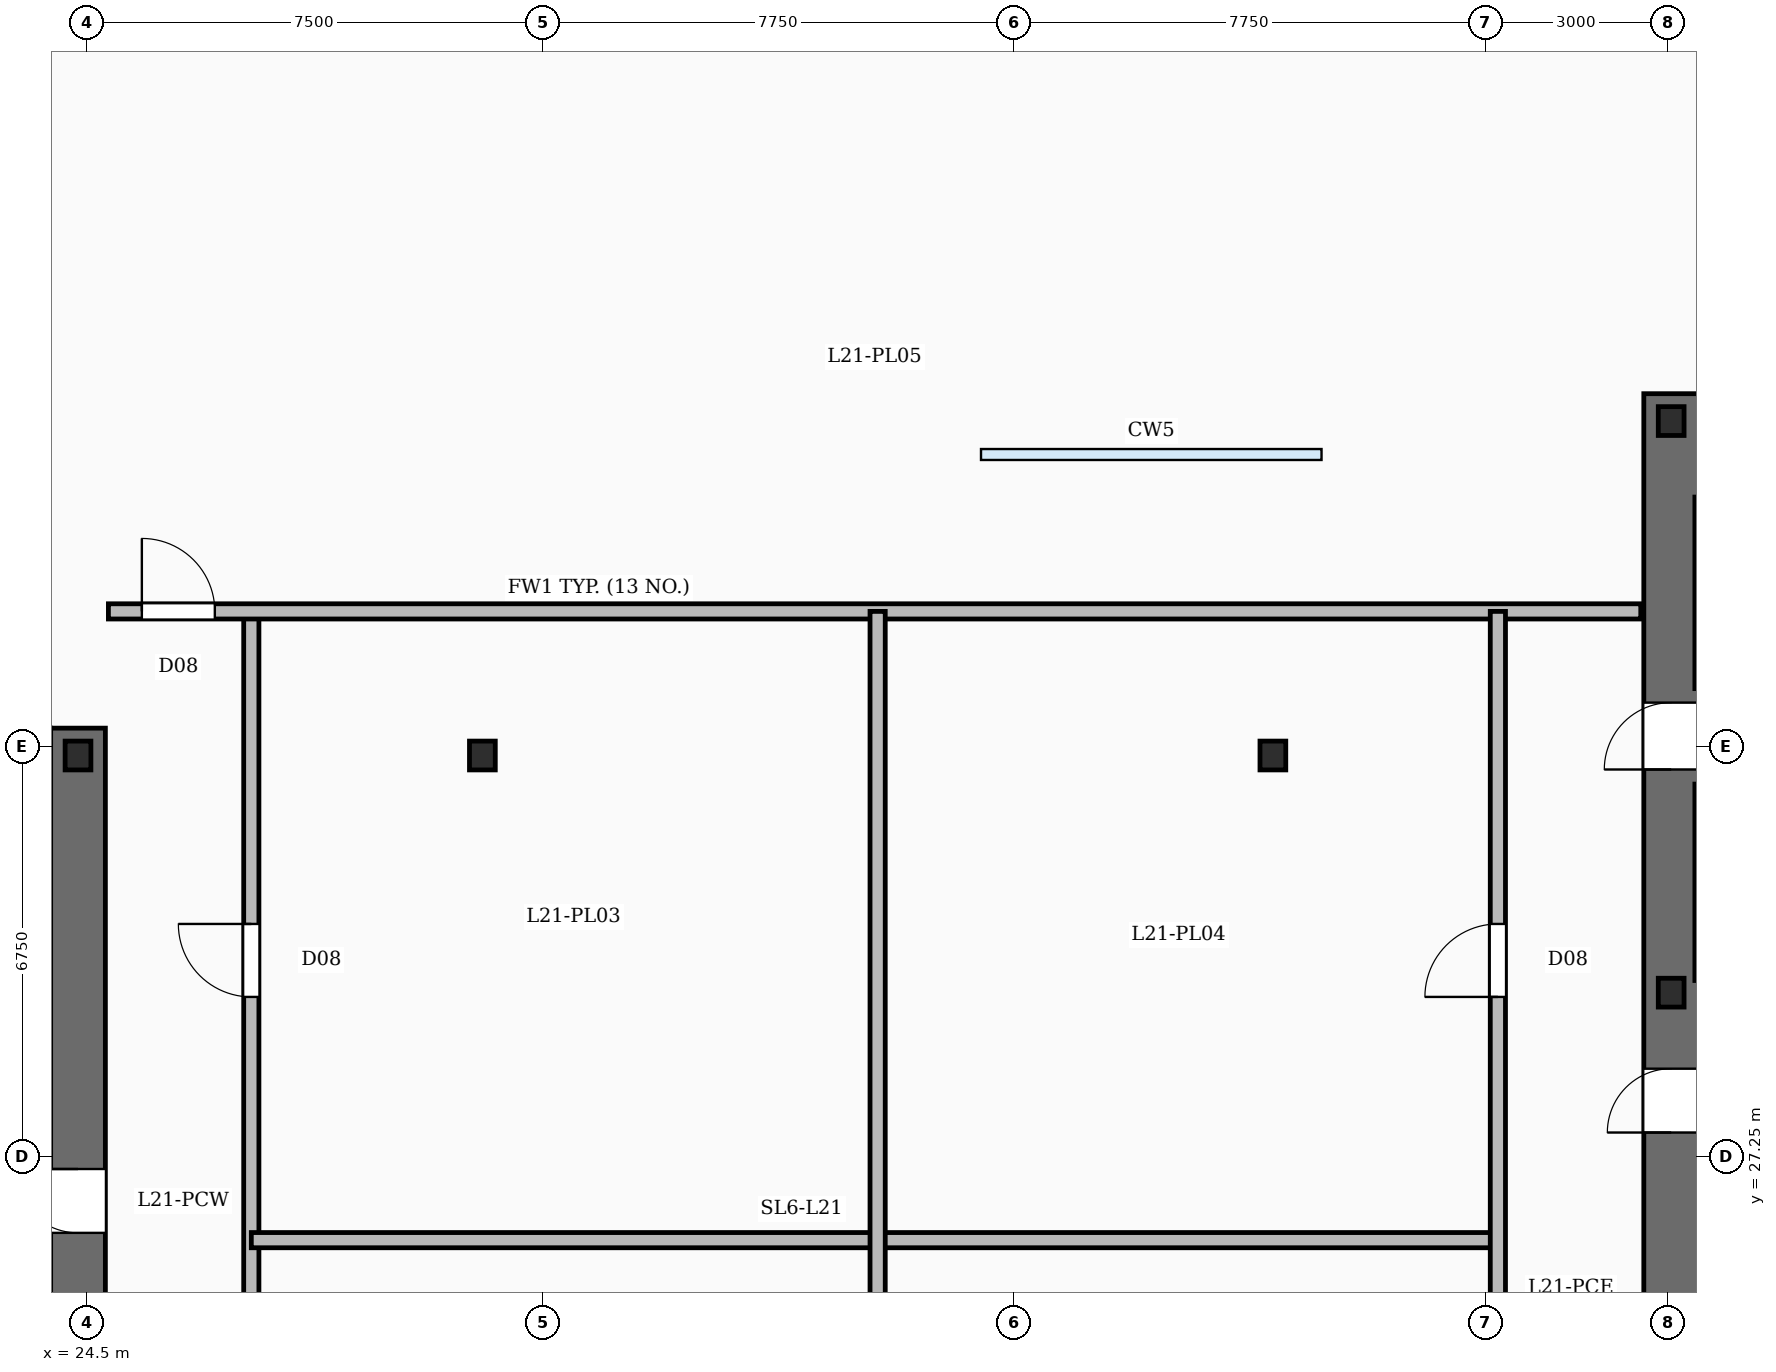
"""IFC4 building model, lengths in metres.
Left out: names, types, materials, properties, quantities, classifications, styles, units other than length and angle.
Written with IfcOpenShell. Run it as: python <this file> out.ifc"""

import sys

from ifc_helpers import new_model, si_unit, direction, frame, frame_2d, origin, origin_2d, place, context, subcontext, project, spatial, rectangle, i_section, extrude, element, fill, save


model = new_model("IFC4")
c1 = context("Model", 3, precision=1e-05, world=origin(), true_north=direction((0.0, 1.0)))
c2 = subcontext(c1, "Body", "Model", "MODEL_VIEW")
j1 = project(units=[si_unit("LENGTHUNIT", "METRE"), si_unit("PLANEANGLEUNIT", "RADIAN")], contexts=[c1])
p1 = place(None, origin())
s1 = spatial("IfcSite", under=j1, at=p1, CompositionType="ELEMENT")
p2 = place(p1, origin())
s2 = spatial("IfcBuilding", under=s1, at=p2, CompositionType="ELEMENT")
p3 = place(p2, frame((0.0, 0.0, 94.5)))
s3 = spatial("IfcBuildingStorey", under=s2, at=p3, CompositionType="ELEMENT", Elevation=94.5)
p4 = place(p3, frame((24.35, 19.0, -0.42), z_axis=(0.0, 0.0, 1.0), x_axis=(0.0, 1.0, 0.0)))
e1 = element("IfcWall", 1, at=p4, inside=s3, PredefinedType="SHEAR", context=c2, shape_type="SweptSolid", body=[
    extrude(rectangle(XDim=15.3, YDim=0.9, at=frame_2d((7.65, 0.0))), origin(), (0.0, 0.0, 1.0), 5.17),
])
p5 = place(p4, frame((2.5, 0.0, 0.42)))
e2 = element("IfcOpeningElement", 2, at=p5, cuts=e1, PredefinedType="OPENING", context=c2, shape_type="SweptSolid", body=[
    extrude(rectangle(XDim=1.05, YDim=2.15, at=frame_2d((0.525, 1.075))), frame((0.0, 0.46, 0.0), z_axis=(0.0, -1.0, 0.0), x_axis=(1.0, 0.0, 0.0)), (0.0, 0.0, 1.0), 0.92),
])
p6 = place(p4, frame((7.0, 0.0, 0.42)))
e3 = element("IfcOpeningElement", 3, at=p6, cuts=e1, PredefinedType="OPENING", context=c2, shape_type="SweptSolid", body=[
    extrude(rectangle(XDim=1.05, YDim=2.15, at=frame_2d((0.525, 1.075))), frame((0.0, 0.46, 0.0), z_axis=(0.0, -1.0, 0.0), x_axis=(1.0, 0.0, 0.0)), (0.0, 0.0, 1.0), 0.92),
])
p7 = place(p3, frame((50.55, 19.0, -0.42), z_axis=(0.0, 0.0, 1.0), x_axis=(0.0, 1.0, 0.0)))
e4 = element("IfcWall", 4, at=p7, inside=s3, PredefinedType="SHEAR", context=c2, shape_type="SweptSolid", body=[
    extrude(rectangle(XDim=20.8, YDim=0.9, at=frame_2d((10.4, 0.0))), origin(), (0.0, 0.0, 1.0), 5.17),
])
p8 = place(p7, frame((2.5, 0.0, 0.42)))
e5 = element("IfcOpeningElement", 5, at=p8, cuts=e4, PredefinedType="OPENING", context=c2, shape_type="SweptSolid", body=[
    extrude(rectangle(XDim=1.05, YDim=2.15, at=frame_2d((0.525, 1.075))), frame((0.0, 0.46, 0.0), z_axis=(0.0, -1.0, 0.0), x_axis=(1.0, 0.0, 0.0)), (0.0, 0.0, 1.0), 0.92),
])
p9 = place(p7, frame((8.65, 0.0, 0.42)))
e6 = element("IfcOpeningElement", 6, at=p9, cuts=e4, PredefinedType="OPENING", context=c2, shape_type="SweptSolid", body=[
    extrude(rectangle(XDim=1.05, YDim=2.15, at=frame_2d((0.525, 1.075))), frame((0.0, 0.46, 0.0), z_axis=(0.0, -1.0, 0.0), x_axis=(1.0, 0.0, 0.0)), (0.0, 0.0, 1.0), 0.92),
])
p10 = place(p7, frame((14.62, 0.0, 0.42)))
e7 = element("IfcOpeningElement", 7, at=p10, cuts=e4, PredefinedType="OPENING", context=c2, shape_type="SweptSolid", body=[
    extrude(rectangle(XDim=1.1, YDim=2.15, at=frame_2d((0.55, 1.075))), frame((0.0, 0.46, 0.0), z_axis=(0.0, -1.0, 0.0), x_axis=(1.0, 0.0, 0.0)), (0.0, 0.0, 1.0), 0.92),
])
for number, where, z_axis, x_axis in (
    (8, (24.35, 33.85, -0.42), (0.0, 0.0, 1.0), (1.0, 0.0, 0.0)),
    (9, (50.55, 29.95, -0.42), (0.0, 0.0, 1.0), (1.0, 0.0, 0.0)),
    (10, (50.55, 39.35, -0.42), (0.0, 0.0, 1.0), (1.0, 0.0, 0.0)),
    (11, (31.0, 33.85, -0.42), (0.0, 0.0, 1.0), (1.0, 0.0, 0.0)),
    (12, (44.0, 33.85, -0.42), (0.0, 0.0, 1.0), (1.0, 0.0, 0.0)),
):
    element("IfcColumn", number, at=place(p3, frame(where, z_axis=z_axis, x_axis=x_axis)), inside=s3, PredefinedType="COLUMN", context=c2, shape_type="SweptSolid", body=[
        extrude(i_section(OverallWidth=0.424, OverallDepth=0.474, WebThickness=0.048, FlangeThickness=0.077, FilletRadius=0.02, at=origin_2d()), origin(), (0.0, 0.0, 1.0), 5.17),
    ])
p11 = place(p3, frame((51.06, 30.15, 0.0), z_axis=(0.0, 0.0, 1.0), x_axis=(0.0, 1.0, 0.0)))
e13 = element("IfcWall", 13, at=p11, inside=s3, PredefinedType="SOLIDWALL", context=c2, shape_type="SweptSolid", body=[
    extrude(rectangle(XDim=3.23, YDim=0.24, at=frame_2d((1.615, 0.0))), origin(), (0.0, 0.0, 1.0), 4.75),
])
p12 = place(p3, frame((51.06, 34.95, 0.0), z_axis=(0.0, 0.0, 1.0), x_axis=(0.0, 1.0, 0.0)))
e14 = element("IfcWall", 14, at=p12, inside=s3, PredefinedType="SOLIDWALL", context=c2, shape_type="SweptSolid", body=[
    extrude(rectangle(XDim=3.15, YDim=0.24, at=frame_2d((1.575, 0.0))), origin(), (0.0, 0.0, 1.0), 4.75),
])
p13 = place(p3, frame((37.5, 15.38, 0.0), z_axis=(0.0, 0.0, 1.0), x_axis=(0.0, 1.0, 0.0)))
e15 = element("IfcWall", 15, at=p13, inside=s3, PredefinedType="SOLIDWALL", context=c2, shape_type="SweptSolid", body=[
    extrude(rectangle(XDim=20.84, YDim=0.25, at=frame_2d((10.42, 0.0))), origin(), (0.0, 0.0, 1.0), 3.81),
])
p14 = place(p3, frame((27.2, 25.88, 0.0), z_axis=(0.0, 0.0, 1.0), x_axis=(1.0, 0.0, 0.0)))
e16 = element("IfcWall", 16, at=p14, inside=s3, PredefinedType="SOLIDWALL", context=c2, shape_type="SweptSolid", body=[
    extrude(rectangle(XDim=20.5, YDim=0.25, at=frame_2d((10.25, 0.0))), origin(), (0.0, 0.0, 1.0), 3.81),
])
p15 = place(p3, frame((24.85, 36.22, 0.0), z_axis=(0.0, 0.0, 1.0), x_axis=(1.0, 0.0, 0.0)))
e17 = element("IfcWall", 17, at=p15, inside=s3, PredefinedType="SOLIDWALL", context=c2, shape_type="SweptSolid", body=[
    extrude(rectangle(XDim=25.2, YDim=0.25, at=frame_2d((12.6, 0.0))), origin(), (0.0, 0.0, 1.0), 3.81),
])
p16 = place(p15, frame((0.55, 0.0, 0.0)))
e18 = element("IfcOpeningElement", 18, at=p16, cuts=e17, PredefinedType="OPENING", context=c2, shape_type="SweptSolid", body=[
    extrude(rectangle(XDim=1.2, YDim=2.2, at=frame_2d((0.6, 1.1))), frame((0.0, 0.135, 0.0), z_axis=(0.0, -1.0, 0.0), x_axis=(1.0, 0.0, 0.0)), (0.0, 0.0, 1.0), 0.27),
])
p17 = place(p3, frame((27.2, 15.38, 0.0), z_axis=(0.0, 0.0, 1.0), x_axis=(0.0, 1.0, 0.0)))
e19 = element("IfcWall", 19, at=p17, inside=s3, PredefinedType="SOLIDWALL", context=c2, shape_type="SweptSolid", body=[
    extrude(rectangle(XDim=20.84, YDim=0.25, at=frame_2d((10.42, 0.0))), origin(), (0.0, 0.0, 1.0), 3.81),
])
p18 = place(p17, frame((4.8, 0.0, 0.0)))
e20 = element("IfcOpeningElement", 20, at=p18, cuts=e19, PredefinedType="OPENING", context=c2, shape_type="SweptSolid", body=[
    extrude(rectangle(XDim=1.2, YDim=2.2, at=frame_2d((0.6, 1.1))), frame((0.0, 0.135, 0.0), z_axis=(0.0, -1.0, 0.0), x_axis=(1.0, 0.0, 0.0)), (0.0, 0.0, 1.0), 0.27),
])
p19 = place(p17, frame((14.5, 0.0, 0.0)))
e21 = element("IfcOpeningElement", 21, at=p19, cuts=e19, PredefinedType="OPENING", context=c2, shape_type="SweptSolid", body=[
    extrude(rectangle(XDim=1.2, YDim=2.2, at=frame_2d((0.6, 1.1))), frame((0.0, 0.135, 0.0), z_axis=(0.0, -1.0, 0.0), x_axis=(1.0, 0.0, 0.0)), (0.0, 0.0, 1.0), 0.27),
])
p20 = place(p3, frame((47.7, 15.38, 0.0), z_axis=(0.0, 0.0, 1.0), x_axis=(0.0, 1.0, 0.0)))
e22 = element("IfcWall", 22, at=p20, inside=s3, PredefinedType="SOLIDWALL", context=c2, shape_type="SweptSolid", body=[
    extrude(rectangle(XDim=20.84, YDim=0.25, at=frame_2d((10.42, 0.0))), origin(), (0.0, 0.0, 1.0), 3.81),
])
p21 = place(p20, frame((4.8, 0.0, 0.0)))
e23 = element("IfcOpeningElement", 23, at=p21, cuts=e22, PredefinedType="OPENING", context=c2, shape_type="SweptSolid", body=[
    extrude(rectangle(XDim=1.2, YDim=2.2, at=frame_2d((0.6, 1.1))), frame((0.0, 0.135, 0.0), z_axis=(0.0, -1.0, 0.0), x_axis=(1.0, 0.0, 0.0)), (0.0, 0.0, 1.0), 0.27),
])
p22 = place(p20, frame((14.5, 0.0, 0.0)))
e24 = element("IfcOpeningElement", 24, at=p22, cuts=e22, PredefinedType="OPENING", context=c2, shape_type="SweptSolid", body=[
    extrude(rectangle(XDim=1.2, YDim=2.2, at=frame_2d((0.6, 1.1))), frame((0.0, 0.135, 0.0), z_axis=(0.0, -1.0, 0.0), x_axis=(1.0, 0.0, 0.0)), (0.0, 0.0, 1.0), 0.27),
])
p23 = place(p6, origin())
e25 = element("IfcDoor", 25, at=p23, inside=s3, OperationType="SINGLE_SWING_RIGHT", PredefinedType="DOOR", context=c2, shape_type="SweptSolid", body=[
    extrude(rectangle(XDim=1.05, YDim=2.15, at=frame_2d((0.525, 1.075))), frame((0.0, 0.025, 0.0), z_axis=(0.0, -1.0, 0.0), x_axis=(1.0, 0.0, 0.0)), (0.0, 0.0, 1.0), 0.05),
])
fill(e3, e25)
p24 = place(p9, origin())
e26 = element("IfcDoor", 26, at=p24, inside=s3, OperationType="SINGLE_SWING_LEFT", PredefinedType="DOOR", context=c2, shape_type="SweptSolid", body=[
    extrude(rectangle(XDim=1.05, YDim=2.15, at=frame_2d((0.525, 1.075))), frame((0.0, 0.025, 0.0), z_axis=(0.0, -1.0, 0.0), x_axis=(1.0, 0.0, 0.0)), (0.0, 0.0, 1.0), 0.05),
])
fill(e6, e26)
p25 = place(p10, origin())
e27 = element("IfcDoor", 27, at=p25, inside=s3, OperationType="SINGLE_SWING_LEFT", PredefinedType="DOOR", context=c2, shape_type="SweptSolid", body=[
    extrude(rectangle(XDim=1.1, YDim=2.15, at=frame_2d((0.55, 1.075))), frame((0.0, 0.025, 0.0), z_axis=(0.0, -1.0, 0.0), x_axis=(1.0, 0.0, 0.0)), (0.0, 0.0, 1.0), 0.05),
])
fill(e7, e27)
p26 = place(p16, origin())
e28 = element("IfcDoor", 28, at=p26, inside=s3, OperationType="SINGLE_SWING_LEFT", PredefinedType="DOOR", context=c2, shape_type="SweptSolid", body=[
    extrude(rectangle(XDim=1.2, YDim=2.2, at=frame_2d((0.6, 1.1))), frame((0.0, 0.025, 0.0), z_axis=(0.0, -1.0, 0.0), x_axis=(1.0, 0.0, 0.0)), (0.0, 0.0, 1.0), 0.05),
])
fill(e18, e28)
p27 = place(p19, origin())
e29 = element("IfcDoor", 29, at=p27, inside=s3, OperationType="SINGLE_SWING_RIGHT", PredefinedType="DOOR", context=c2, shape_type="SweptSolid", body=[
    extrude(rectangle(XDim=1.2, YDim=2.2, at=frame_2d((0.6, 1.1))), frame((0.0, 0.025, 0.0), z_axis=(0.0, -1.0, 0.0), x_axis=(1.0, 0.0, 0.0)), (0.0, 0.0, 1.0), 0.05),
])
fill(e21, e29)
p28 = place(p22, origin())
e30 = element("IfcDoor", 30, at=p28, inside=s3, OperationType="SINGLE_SWING_LEFT", PredefinedType="DOOR", context=c2, shape_type="SweptSolid", body=[
    extrude(rectangle(XDim=1.2, YDim=2.2, at=frame_2d((0.6, 1.1))), frame((0.0, 0.025, 0.0), z_axis=(0.0, -1.0, 0.0), x_axis=(1.0, 0.0, 0.0)), (0.0, 0.0, 1.0), 0.05),
])
fill(e24, e30)
save(model, sys.argv[1])
